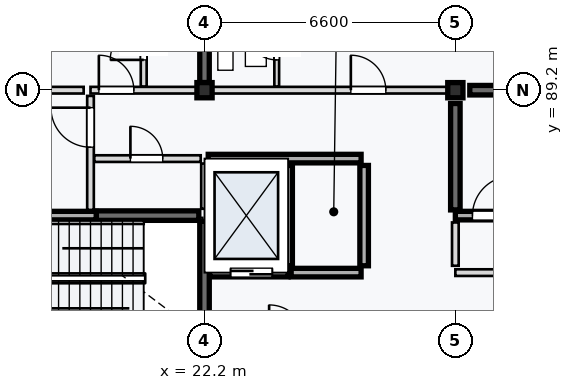
"""IFC4 building model, lengths in metres.
Left out: names, types, materials, properties, quantities, classifications, styles, units other than length and angle.
Written with IfcOpenShell. Run it as: python <this file> out.ifc"""

import sys

from ifc_helpers import new_model, si_unit, direction, frame, frame_2d, origin, origin_2d, place, context, subcontext, project, spatial, rectangle, extrude, element, fill, save


model = new_model("IFC4")
c1 = context("Model", 3, precision=1e-05, world=origin(), true_north=direction((0.0, 1.0)))
c2 = subcontext(c1, "Body", "Model", "MODEL_VIEW")
j1 = project(units=[si_unit("LENGTHUNIT", "METRE"), si_unit("PLANEANGLEUNIT", "RADIAN")], contexts=[c1])
p1 = place(None, origin())
s1 = spatial("IfcSite", under=j1, at=p1, CompositionType="ELEMENT")
p2 = place(p1, origin())
s2 = spatial("IfcBuilding", under=s1, at=p2, CompositionType="ELEMENT")
p3 = place(p2, frame((0.0, 0.0, 50.0)))
s3 = spatial("IfcBuildingStorey", under=s2, at=p3, CompositionType="ELEMENT", Elevation=50.0)
for number, where, z_axis, x_axis in (
    (1, (22.2, 89.2, 0.0), (0.0, 0.0, 1.0), (1.0, 0.0, 0.0)),
    (2, (28.8, 89.2, 0.0), (0.0, 0.0, 1.0), (1.0, 0.0, 0.0)),
):
    element("IfcColumn", number, at=place(p3, frame(where, z_axis=z_axis, x_axis=x_axis)), inside=s3, PredefinedType="COLUMN", context=c2, shape_type="SweptSolid", body=[
        extrude(rectangle(XDim=0.4, YDim=0.4, at=origin_2d()), origin(), (0.0, 0.0, 1.0), 3.2),
    ])
p4 = place(p3, frame((19.35, 85.9, 0.0), z_axis=(0.0, 0.0, 1.0), x_axis=(1.0, 0.0, 0.0)))
e3 = element("IfcWall", 3, at=p4, inside=s3, PredefinedType="SHEAR", context=c2, shape_type="SweptSolid", body=[
    extrude(rectangle(XDim=2.7, YDim=0.25, at=frame_2d((1.35, 0.0))), origin(), (0.0, 0.0, 1.0), 2.98),
])
p5 = place(p3, frame((22.2, 82.95, 0.0), z_axis=(0.0, 0.0, 1.0), x_axis=(0.0, 1.0, 0.0)))
e4 = element("IfcWall", 4, at=p5, inside=s3, PredefinedType="SHEAR", context=c2, shape_type="SweptSolid", body=[
    extrude(rectangle(XDim=2.8, YDim=0.25, at=frame_2d((1.4, 0.0))), origin(), (0.0, 0.0, 1.0), 2.98),
])
p6 = place(p3, frame((29.18, 89.2, 0.0), z_axis=(0.0, 0.0, 1.0), x_axis=(1.0, 0.0, 0.0)))
e5 = element("IfcWall", 5, at=p6, inside=s3, PredefinedType="SHEAR", context=c2, shape_type="SweptSolid", body=[
    extrude(rectangle(XDim=5.84, YDim=0.25, at=frame_2d((2.92, 0.0))), origin(), (0.0, 0.0, 1.0), 2.98),
])
p7 = place(p3, frame((28.8, 86.05, 0.0), z_axis=(0.0, 0.0, 1.0), x_axis=(0.0, 1.0, 0.0)))
e6 = element("IfcWall", 6, at=p7, inside=s3, PredefinedType="SHEAR", context=c2, shape_type="SweptSolid", body=[
    extrude(rectangle(XDim=2.8, YDim=0.25, at=frame_2d((1.4, 0.0))), origin(), (0.0, 0.0, 1.0), 2.98),
])
p8 = place(p3, frame((22.2, 89.4, 0.0), z_axis=(0.0, 0.0, 1.0), x_axis=(0.0, 1.0, 0.0)))
e7 = element("IfcWall", 7, at=p8, inside=s3, PredefinedType="SHEAR", context=c2, shape_type="SweptSolid", body=[
    extrude(rectangle(XDim=6.2, YDim=0.25, at=frame_2d((3.1, 0.0))), origin(), (0.0, 0.0, 1.0), 2.98),
])
p9 = place(p3, frame((15.75, 85.9, 0.0), z_axis=(0.0, 0.0, 1.0), x_axis=(1.0, 0.0, 0.0)))
e8 = element("IfcWall", 8, at=p9, inside=s3, PredefinedType="STANDARD", context=c2, shape_type="SweptSolid", body=[
    extrude(rectangle(XDim=3.6, YDim=0.225, at=frame_2d((1.8, 0.0))), origin(), (0.0, 0.0, 1.0), 2.98),
])
p10 = place(p9, frame((0.45, 0.0, 0.0)))
e9 = element("IfcOpeningElement", 9, at=p10, cuts=e8, PredefinedType="OPENING", context=c2, shape_type="SweptSolid", body=[
    extrude(rectangle(XDim=1.0, YDim=2.16, at=frame_2d((0.5, 1.08))), frame((0.0, 0.123, 0.0), z_axis=(0.0, -1.0, 0.0), x_axis=(1.0, 0.0, 0.0)), (0.0, 0.0, 1.0), 0.245),
])
p11 = place(p3, frame((19.2, 86.05, 0.0), z_axis=(0.0, 0.0, 1.0), x_axis=(0.0, 1.0, 0.0)))
e10 = element("IfcWall", 10, at=p11, inside=s3, PredefinedType="PARTITIONING", context=c2, shape_type="SweptSolid", body=[
    extrude(rectangle(XDim=3.0, YDim=0.175, at=frame_2d((1.5, 0.0))), origin(), (0.0, 0.0, 1.0), 2.98),
])
p12 = place(p11, frame((1.65, 0.0, 0.0)))
e11 = element("IfcOpeningElement", 11, at=p12, cuts=e10, PredefinedType="OPENING", context=c2, shape_type="SweptSolid", body=[
    extrude(rectangle(XDim=1.04, YDim=2.12, at=frame_2d((0.52, 1.06))), frame((0.0, 0.097, 0.0), z_axis=(0.0, -1.0, 0.0), x_axis=(1.0, 0.0, 0.0)), (0.0, 0.0, 1.0), 0.195),
])
p13 = place(p3, frame((19.3, 87.4, 0.0), z_axis=(0.0, 0.0, 1.0), x_axis=(1.0, 0.0, 0.0)))
e12 = element("IfcWall", 12, at=p13, inside=s3, PredefinedType="PARTITIONING", context=c2, shape_type="SweptSolid", body=[
    extrude(rectangle(XDim=2.8, YDim=0.175, at=frame_2d((1.4, 0.0))), origin(), (0.0, 0.0, 1.0), 2.98),
])
p14 = place(p13, frame((0.95, 0.0, 0.0)))
e13 = element("IfcOpeningElement", 13, at=p14, cuts=e12, PredefinedType="OPENING", context=c2, shape_type="SweptSolid", body=[
    extrude(rectangle(XDim=0.85, YDim=2.0, at=frame_2d((0.425, 1.0))), frame((0.0, 0.097, 0.0), z_axis=(0.0, -1.0, 0.0), x_axis=(1.0, 0.0, 0.0)), (0.0, 0.0, 1.0), 0.195),
])
p15 = place(p3, frame((22.2, 86.08, 0.0), z_axis=(0.0, 0.0, 1.0), x_axis=(0.0, 1.0, 0.0)))
e14 = element("IfcWall", 14, at=p15, inside=s3, PredefinedType="PARTITIONING", context=c2, shape_type="SweptSolid", body=[
    extrude(rectangle(XDim=1.19, YDim=0.175, at=frame_2d((0.595, 0.0))), origin(), (0.0, 0.0, 1.0), 2.98),
])
p16 = place(p3, frame((22.335, 84.4, 0.0), z_axis=(0.0, 0.0, 1.0), x_axis=(1.0, 0.0, 0.0)))
e15 = element("IfcWall", 15, at=p16, inside=s3, PredefinedType="STANDARD", context=c2, shape_type="SweptSolid", body=[
    extrude(rectangle(XDim=2.065, YDim=0.225, at=frame_2d((1.032, 0.0))), origin(), (0.0, 0.0, 1.0), 2.98),
])
p17 = place(p16, frame((0.55, 0.0, 0.0)))
e16 = element("IfcOpeningElement", 16, at=p17, cuts=e15, PredefinedType="OPENING", context=c2, shape_type="SweptSolid", body=[
    extrude(rectangle(XDim=1.1, YDim=2.1, at=frame_2d((0.55, 1.05))), frame((0.0, 0.123, 0.0), z_axis=(0.0, -1.0, 0.0), x_axis=(1.0, 0.0, 0.0)), (0.0, 0.0, 1.0), 0.245),
])
p18 = place(p3, frame((24.48, 84.4, 0.0), z_axis=(0.0, 0.0, 1.0), x_axis=(1.0, 0.0, 0.0)))
e17 = element("IfcWall", 17, at=p18, inside=s3, PredefinedType="STANDARD", context=c2, shape_type="SweptSolid", body=[
    extrude(rectangle(XDim=1.84, YDim=0.225, at=frame_2d((0.92, 0.0))), origin(), (0.0, 0.0, 1.0), 2.98),
])
p19 = place(p3, frame((22.298, 87.4, 0.0), z_axis=(0.0, 0.0, 1.0), x_axis=(1.0, 0.0, 0.0)))
e18 = element("IfcWall", 18, at=p19, inside=s3, PredefinedType="STANDARD", context=c2, shape_type="SweptSolid", body=[
    extrude(rectangle(XDim=4.022, YDim=0.225, at=frame_2d((2.011, 0.0))), origin(), (0.0, 0.0, 1.0), 2.98),
])
for number, where, z_axis, x_axis in (
    (19, (24.4, 84.58, 0.0), (0.0, 0.0, 1.0), (0.0, 1.0, 0.0)),
    (20, (26.4, 84.58, 0.0), (0.0, 0.0, 1.0), (0.0, 1.0, 0.0)),
):
    element("IfcWall", number, at=place(p3, frame(where, z_axis=z_axis, x_axis=x_axis)), inside=s3, PredefinedType="STANDARD", context=c2, shape_type="SweptSolid", body=[
        extrude(rectangle(XDim=2.64, YDim=0.225, at=frame_2d((1.32, 0.0))), origin(), (0.0, 0.0, 1.0), 2.98),
    ])
p20 = place(p3, frame((28.8, 85.9, 0.0), z_axis=(0.0, 0.0, 1.0), x_axis=(1.0, 0.0, 0.0)))
e21 = element("IfcWall", 21, at=p20, inside=s3, PredefinedType="STANDARD", context=c2, shape_type="SweptSolid", body=[
    extrude(rectangle(XDim=3.45, YDim=0.225, at=frame_2d((1.725, 0.0))), origin(), (0.0, 0.0, 1.0), 2.98),
])
p21 = place(p20, frame((0.45, 0.0, 0.0)))
e22 = element("IfcOpeningElement", 22, at=p21, cuts=e21, PredefinedType="OPENING", context=c2, shape_type="SweptSolid", body=[
    extrude(rectangle(XDim=1.04, YDim=2.12, at=frame_2d((0.52, 1.06))), frame((0.0, 0.123, 0.0), z_axis=(0.0, -1.0, 0.0), x_axis=(1.0, 0.0, 0.0)), (0.0, 0.0, 1.0), 0.245),
])
p22 = place(p3, frame((28.8, 84.4, 0.0), z_axis=(0.0, 0.0, 1.0), x_axis=(1.0, 0.0, 0.0)))
e23 = element("IfcWall", 23, at=p22, inside=s3, PredefinedType="PARTITIONING", context=c2, shape_type="SweptSolid", body=[
    extrude(rectangle(XDim=3.3, YDim=0.175, at=frame_2d((1.65, 0.0))), origin(), (0.0, 0.0, 1.0), 2.98),
])
p23 = place(p22, frame((1.8, 0.0, 0.0)))
e24 = element("IfcOpeningElement", 24, at=p23, cuts=e23, PredefinedType="OPENING", context=c2, shape_type="SweptSolid", body=[
    extrude(rectangle(XDim=1.0, YDim=2.1, at=frame_2d((0.5, 1.05))), frame((0.0, 0.097, 0.0), z_axis=(0.0, -1.0, 0.0), x_axis=(1.0, 0.0, 0.0)), (0.0, 0.0, 1.0), 0.195),
])
p24 = place(p3, frame((28.8, 84.58, 0.0), z_axis=(0.0, 0.0, 1.0), x_axis=(0.0, 1.0, 0.0)))
e25 = element("IfcWall", 25, at=p24, inside=s3, PredefinedType="PARTITIONING", context=c2, shape_type="SweptSolid", body=[
    extrude(rectangle(XDim=1.14, YDim=0.175, at=frame_2d((0.57, 0.0))), origin(), (0.0, 0.0, 1.0), 2.98),
])
p25 = place(p3, frame((15.88, 89.2, 0.0), z_axis=(0.0, 0.0, 1.0), x_axis=(1.0, 0.0, 0.0)))
e26 = element("IfcWall", 26, at=p25, inside=s3, PredefinedType="PARTITIONING", context=c2, shape_type="SweptSolid", body=[
    extrude(rectangle(XDim=3.14, YDim=0.175, at=frame_2d((1.57, 0.0))), origin(), (0.0, 0.0, 1.0), 2.55),
])
p26 = place(p3, frame((19.2, 89.2, 0.0), z_axis=(0.0, 0.0, 1.0), x_axis=(1.0, 0.0, 0.0)))
e27 = element("IfcWall", 27, at=p26, inside=s3, PredefinedType="PARTITIONING", context=c2, shape_type="SweptSolid", body=[
    extrude(rectangle(XDim=3.0, YDim=0.175, at=frame_2d((1.5, 0.0))), origin(), (0.0, 0.0, 1.0), 2.55),
])
p27 = place(p26, frame((0.22, 0.0, 0.0)))
e28 = element("IfcOpeningElement", 28, at=p27, cuts=e27, PredefinedType="OPENING", context=c2, shape_type="SweptSolid", body=[
    extrude(rectangle(XDim=0.92, YDim=2.14, at=frame_2d((0.46, 1.07))), frame((0.0, 0.097, 0.0), z_axis=(0.0, -1.0, 0.0), x_axis=(1.0, 0.0, 0.0)), (0.0, 0.0, 1.0), 0.195),
])
p28 = place(p3, frame((20.6, 89.298, 0.0), z_axis=(0.0, 0.0, 1.0), x_axis=(0.0, 1.0, 0.0)))
e29 = element("IfcWall", 29, at=p28, inside=s3, PredefinedType="PARTITIONING", context=c2, shape_type="SweptSolid", body=[
    extrude(rectangle(XDim=2.302, YDim=0.155, at=frame_2d((1.151, 0.0))), origin(), (0.0, 0.0, 1.0), 2.98),
])
p29 = place(p28, frame((0.7, 0.0, 0.0)))
e30 = element("IfcOpeningElement", 30, at=p29, cuts=e29, PredefinedType="OPENING", context=c2, shape_type="SweptSolid", body=[
    extrude(rectangle(XDim=0.88, YDim=2.1, at=frame_2d((0.44, 1.05))), frame((0.0, 0.087, 0.0), z_axis=(0.0, -1.0, 0.0), x_axis=(1.0, 0.0, 0.0)), (0.0, 0.0, 1.0), 0.175),
])
p30 = place(p3, frame((22.2, 89.2, 0.0), z_axis=(0.0, 0.0, 1.0), x_axis=(1.0, 0.0, 0.0)))
e31 = element("IfcWall", 31, at=p30, inside=s3, PredefinedType="PARTITIONING", context=c2, shape_type="SweptSolid", body=[
    extrude(rectangle(XDim=6.6, YDim=0.175, at=frame_2d((3.3, 0.0))), origin(), (0.0, 0.0, 1.0), 2.55),
])
p31 = place(p30, frame((3.85, 0.0, 0.0)))
e32 = element("IfcOpeningElement", 32, at=p31, cuts=e31, PredefinedType="OPENING", context=c2, shape_type="SweptSolid", body=[
    extrude(rectangle(XDim=0.92, YDim=2.14, at=frame_2d((0.46, 1.07))), frame((0.0, 0.097, 0.0), z_axis=(0.0, -1.0, 0.0), x_axis=(1.0, 0.0, 0.0)), (0.0, 0.0, 1.0), 0.195),
])
p32 = place(p3, frame((24.1, 89.298, 0.0), z_axis=(0.0, 0.0, 1.0), x_axis=(0.0, 1.0, 0.0)))
e33 = element("IfcWall", 33, at=p32, inside=s3, PredefinedType="PARTITIONING", context=c2, shape_type="SweptSolid", body=[
    extrude(rectangle(XDim=2.302, YDim=0.125, at=frame_2d((1.151, 0.0))), origin(), (0.0, 0.0, 1.0), 2.98),
])
p33 = place(p32, frame((0.7, 0.0, 0.0)))
e34 = element("IfcOpeningElement", 34, at=p33, cuts=e33, PredefinedType="OPENING", context=c2, shape_type="SweptSolid", body=[
    extrude(rectangle(XDim=0.82, YDim=2.05, at=frame_2d((0.41, 1.025))), frame((0.0, 0.073, 0.0), z_axis=(0.0, -1.0, 0.0), x_axis=(1.0, 0.0, 0.0)), (0.0, 0.0, 1.0), 0.145),
])
p34 = place(p12, origin())
e35 = element("IfcDoor", 35, at=p34, inside=s3, OperationType="SINGLE_SWING_RIGHT", PredefinedType="DOOR", context=c2, shape_type="SweptSolid", body=[
    extrude(rectangle(XDim=1.04, YDim=2.12, at=frame_2d((0.52, 1.06))), frame((0.0, 0.025, 0.0), z_axis=(0.0, -1.0, 0.0), x_axis=(1.0, 0.0, 0.0)), (0.0, 0.0, 1.0), 0.05),
])
fill(e11, e35)
p35 = place(p14, origin())
e36 = element("IfcDoor", 36, at=p35, inside=s3, OperationType="SINGLE_SWING_LEFT", PredefinedType="DOOR", context=c2, shape_type="SweptSolid", body=[
    extrude(rectangle(XDim=0.85, YDim=2.0, at=frame_2d((0.425, 1.0))), frame((0.0, 0.025, 0.0), z_axis=(0.0, -1.0, 0.0), x_axis=(1.0, 0.0, 0.0)), (0.0, 0.0, 1.0), 0.05),
])
fill(e13, e36)
p36 = place(p17, origin())
e37 = element("IfcDoor", 37, at=p36, inside=s3, OperationType="DOUBLE_DOOR_SLIDING", PredefinedType="DOOR", context=c2, shape_type="SweptSolid", body=[
    extrude(rectangle(XDim=1.1, YDim=2.1, at=frame_2d((0.55, 1.05))), frame((0.0, 0.025, 0.0), z_axis=(0.0, -1.0, 0.0), x_axis=(1.0, 0.0, 0.0)), (0.0, 0.0, 1.0), 0.05),
])
fill(e16, e37)
p37 = place(p21, origin())
e38 = element("IfcDoor", 38, at=p37, inside=s3, OperationType="SINGLE_SWING_RIGHT", PredefinedType="DOOR", context=c2, shape_type="SweptSolid", body=[
    extrude(rectangle(XDim=1.04, YDim=2.12, at=frame_2d((0.52, 1.06))), frame((0.0, 0.025, 0.0), z_axis=(0.0, -1.0, 0.0), x_axis=(1.0, 0.0, 0.0)), (0.0, 0.0, 1.0), 0.05),
])
fill(e22, e38)
p38 = place(p27, origin())
e39 = element("IfcDoor", 39, at=p38, inside=s3, OperationType="SINGLE_SWING_LEFT", PredefinedType="DOOR", context=c2, shape_type="SweptSolid", body=[
    extrude(rectangle(XDim=0.92, YDim=2.14, at=frame_2d((0.46, 1.07))), frame((0.0, 0.025, 0.0), z_axis=(0.0, -1.0, 0.0), x_axis=(1.0, 0.0, 0.0)), (0.0, 0.0, 1.0), 0.05),
])
fill(e28, e39)
p39 = place(p29, origin())
e40 = element("IfcDoor", 40, at=p39, inside=s3, OperationType="SINGLE_SWING_LEFT", PredefinedType="DOOR", context=c2, shape_type="SweptSolid", body=[
    extrude(rectangle(XDim=0.88, YDim=2.1, at=frame_2d((0.44, 1.05))), frame((0.0, 0.025, 0.0), z_axis=(0.0, -1.0, 0.0), x_axis=(1.0, 0.0, 0.0)), (0.0, 0.0, 1.0), 0.05),
])
fill(e30, e40)
p40 = place(p31, origin())
e41 = element("IfcDoor", 41, at=p40, inside=s3, OperationType="SINGLE_SWING_LEFT", PredefinedType="DOOR", context=c2, shape_type="SweptSolid", body=[
    extrude(rectangle(XDim=0.92, YDim=2.14, at=frame_2d((0.46, 1.07))), frame((0.0, 0.025, 0.0), z_axis=(0.0, -1.0, 0.0), x_axis=(1.0, 0.0, 0.0)), (0.0, 0.0, 1.0), 0.05),
])
fill(e32, e41)
p41 = place(p33, origin())
e42 = element("IfcDoor", 42, at=p41, inside=s3, OperationType="SINGLE_SWING_RIGHT", PredefinedType="DOOR", context=c2, shape_type="SweptSolid", body=[
    extrude(rectangle(XDim=0.82, YDim=2.05, at=frame_2d((0.41, 1.025))), frame((0.0, 0.025, 0.0), z_axis=(0.0, -1.0, 0.0), x_axis=(1.0, 0.0, 0.0)), (0.0, 0.0, 1.0), 0.05),
])
fill(e34, e42)
save(model, sys.argv[1])
